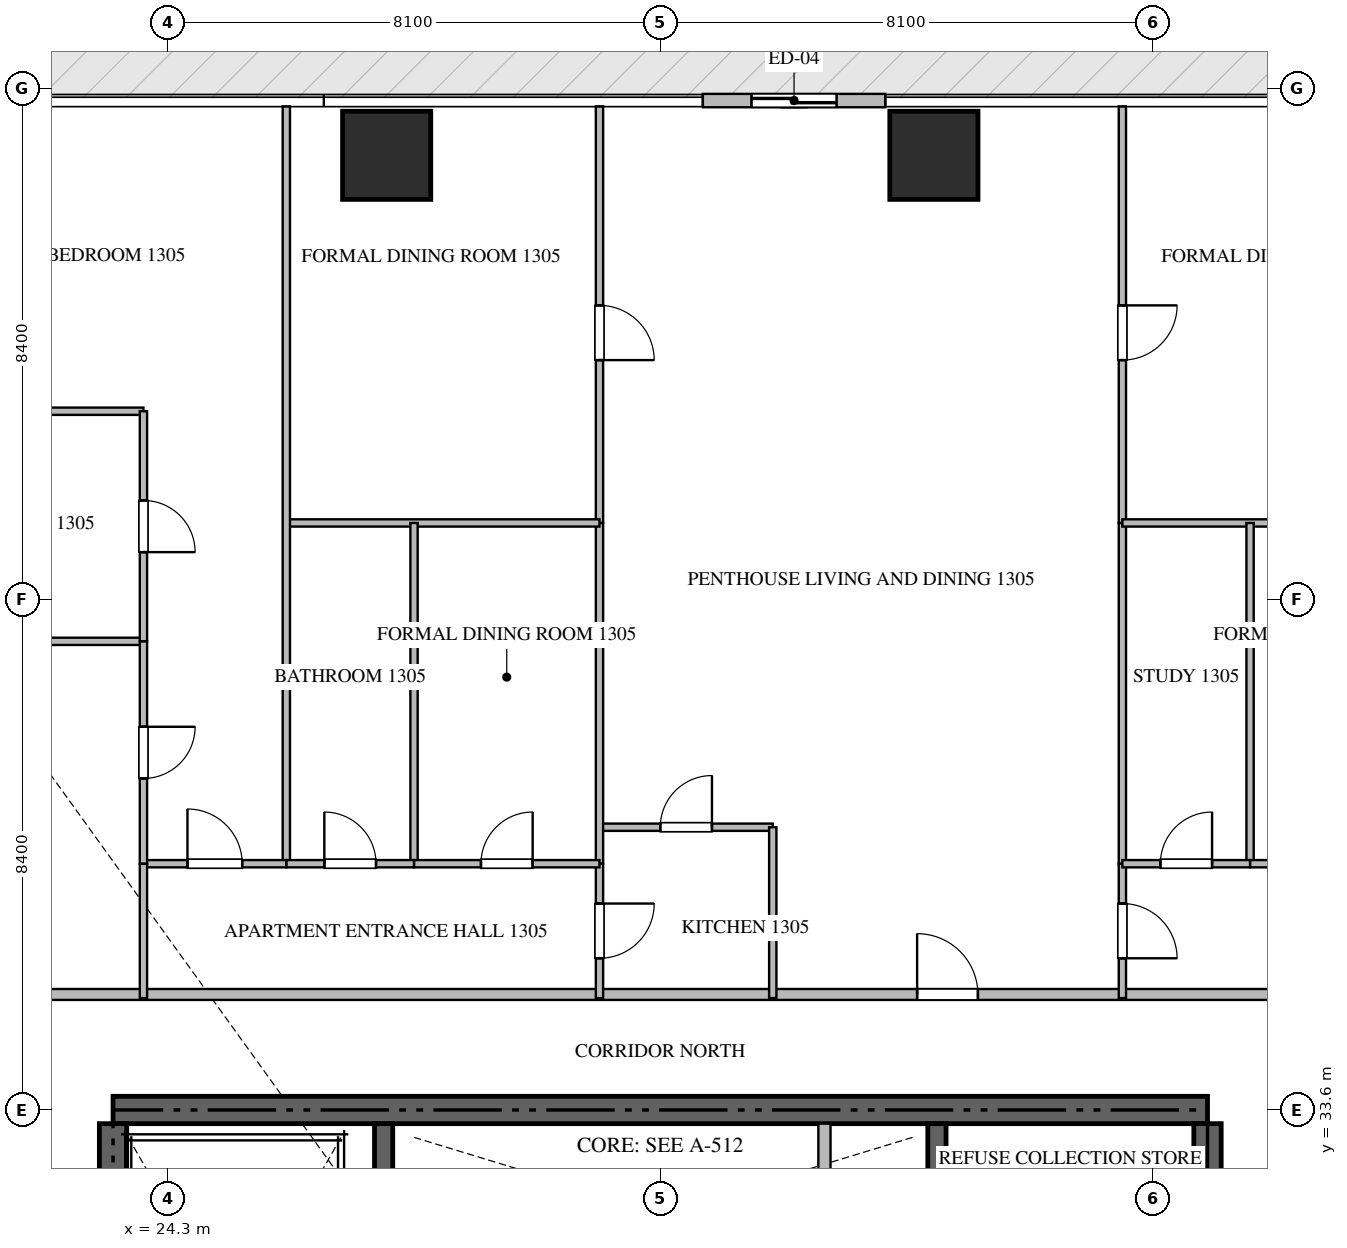
"""IFC4 building model, lengths in metres.
Left out: names, types, materials, properties, quantities, classifications, styles, units other than length and angle.
Written with IfcOpenShell. Run it as: python <this file> out.ifc"""

import sys

from ifc_helpers import new_model, si_unit, direction, frame, frame_2d, origin, origin_2d, place, context, subcontext, project, spatial, rectangle, extrude, source, transform, mapped, element, fill, save


model = new_model("IFC4")
c1 = context("Model", 3, precision=1e-05, world=origin(), true_north=direction((0.0, 1.0)))
c2 = subcontext(c1, "Body", "Model", "MODEL_VIEW")
j1 = project(units=[si_unit("LENGTHUNIT", "METRE"), si_unit("PLANEANGLEUNIT", "RADIAN")], contexts=[c1])
p1 = place(None, origin())
s1 = spatial("IfcSite", under=j1, at=p1, CompositionType="ELEMENT")
p2 = place(p1, origin())
s2 = spatial("IfcBuilding", under=s1, at=p2, CompositionType="ELEMENT")
p3 = place(p2, frame((0.0, 0.0, 56.7)))
s3 = spatial("IfcBuildingStorey", under=s2, at=p3, CompositionType="ELEMENT", Elevation=56.7)
p4 = place(p3, frame((41.4, 33.6, -0.26), z_axis=(0.0, 0.0, 1.0), x_axis=(-1.0, 0.0, 0.0)))
e1 = element("IfcWall", 1, at=p4, inside=s3, PredefinedType="SHEAR", context=c2, shape_type="SweptSolid", body=[
    extrude(rectangle(XDim=18.0, YDim=0.45, at=frame_2d((9.0, 0.0))), origin(), (0.0, 0.0, 1.0), 3.748),
])
p5 = place(p3, frame((23.4, 24.25, -0.26), z_axis=(0.0, 0.0, 1.0), x_axis=(0.0, 1.0, 0.0)))
e2 = element("IfcWall", 2, at=p5, inside=s3, PredefinedType="SHEAR", context=c2, shape_type="SweptSolid", body=[
    extrude(rectangle(XDim=9.125, YDim=0.45, at=frame_2d((4.562, 0.0))), origin(), (0.0, 0.0, 1.0), 3.748),
])
p6 = place(p3, frame((41.4, 27.75, -0.26), z_axis=(0.0, 0.0, 1.0), x_axis=(0.0, 1.0, 0.0)))
e3 = element("IfcWall", 3, at=p6, inside=s3, PredefinedType="SHEAR", context=c2, shape_type="SweptSolid", body=[
    extrude(rectangle(XDim=5.625, YDim=0.45, at=frame_2d((2.812, 0.0))), origin(), (0.0, 0.0, 1.0), 3.748),
])
p7 = place(p3, frame((27.85, 23.55, -0.26), z_axis=(0.0, 0.0, 1.0), x_axis=(0.0, 1.0, 0.0)))
e4 = element("IfcWall", 4, at=p7, inside=s3, PredefinedType="SHEAR", context=c2, shape_type="SweptSolid", body=[
    extrude(rectangle(XDim=9.825, YDim=0.3, at=frame_2d((4.913, 0.0))), origin(), (0.0, 0.0, 1.0), 3.748),
])
p8 = place(p3, frame((36.95, 27.05, -0.26), z_axis=(0.0, 0.0, 1.0), x_axis=(0.0, 1.0, 0.0)))
e5 = element("IfcWall", 5, at=p8, inside=s3, PredefinedType="SHEAR", context=c2, shape_type="SweptSolid", body=[
    extrude(rectangle(XDim=6.325, YDim=0.3, at=frame_2d((3.163, 0.0))), origin(), (0.0, 0.0, 1.0), 3.748),
])
m1 = source(origin(), c2, "Body", "SweptSolid", [
    extrude(rectangle(XDim=1.45, YDim=1.45, at=origin_2d()), origin(), (0.0, 0.0, 1.0), 3.75),
])
for number, where, z_axis, x_axis in (
    (6, (27.9, 49.3, -0.26), (0.0, 0.0, 1.0), (1.0, 0.0, 0.0)),
    (7, (36.9, 49.3, -0.26), (0.0, 0.0, 1.0), (1.0, 0.0, 0.0)),
):
    element("IfcColumn", number, at=place(p3, frame(where, z_axis=z_axis, x_axis=x_axis)), inside=s3, PredefinedType="COLUMN", context=c2, shape_type="MappedRepresentation", body=[
        mapped(m1, transform((0.0, 0.0, 0.0), scale=1.0)),
    ])
p9 = place(p3, frame((36.1, 50.2, 0.0), z_axis=(0.0, 0.0, 1.0), x_axis=(-1.0, 0.0, 0.0)))
e8 = element("IfcWall", 8, at=p9, inside=s3, PredefinedType="ELEMENTEDWALL", context=c2, shape_type="SweptSolid", body=[
    extrude(rectangle(XDim=3.0, YDim=0.22, at=frame_2d((1.5, 0.0))), origin(), (0.0, 0.0, 1.0), 3.475),
])
p10 = place(p9, frame((0.8, 0.0, 0.0)))
e9 = element("IfcOpeningElement", 9, at=p10, cuts=e8, PredefinedType="OPENING", context=c2, shape_type="SweptSolid", body=[
    extrude(rectangle(XDim=1.4, YDim=2.25, at=frame_2d((0.7, 1.125))), frame((0.0, 0.12, 0.0), z_axis=(0.0, -1.0, 0.0), x_axis=(1.0, 0.0, 0.0)), (0.0, 0.0, 1.0), 0.24),
])
p11 = place(p3, frame((35.1, 30.75, 0.0), z_axis=(0.0, 0.0, 1.0), x_axis=(0.0, 1.0, 0.0)))
e10 = element("IfcWall", 10, at=p11, inside=s3, PredefinedType="STANDARD", context=c2, shape_type="SweptSolid", body=[
    extrude(rectangle(XDim=2.625, YDim=0.2, at=frame_2d((1.312, 0.0))), origin(), (0.0, 0.0, 1.0), 3.49),
])
p12 = place(p3, frame((21.402, 35.5, 0.0), z_axis=(0.0, 0.0, 1.0), x_axis=(1.0, 0.0, 0.0)))
e11 = element("IfcWall", 11, at=p12, inside=s3, PredefinedType="PARTITIONING", context=c2, shape_type="SweptSolid", body=[
    extrude(rectangle(XDim=21.996, YDim=0.18, at=frame_2d((10.998, 0.0))), origin(), (0.0, 0.0, 1.0), 3.49),
])
p13 = place(p12, frame((15.222, 0.0, 0.0)))
e12 = element("IfcOpeningElement", 12, at=p13, cuts=e11, PredefinedType="OPENING", context=c2, shape_type="SweptSolid", body=[
    extrude(rectangle(XDim=1.0, YDim=2.15, at=frame_2d((0.5, 1.075))), frame((0.0, 0.1, 0.0), z_axis=(0.0, -1.0, 0.0), x_axis=(1.0, 0.0, 0.0)), (0.0, 0.0, 1.0), 0.2),
])
p14 = place(p3, frame((31.4, 38.25, 0.0), z_axis=(0.0, 0.0, 1.0), x_axis=(1.0, 0.0, 0.0)))
e13 = element("IfcWall", 13, at=p14, inside=s3, PredefinedType="PARTITIONING", context=c2, shape_type="SweptSolid", body=[
    extrude(rectangle(XDim=2.85, YDim=0.12, at=frame_2d((1.425, 0.0))), origin(), (0.0, 0.0, 1.0), 3.49),
])
p15 = place(p14, frame((1.0, 0.0, 0.0)))
e14 = element("IfcOpeningElement", 14, at=p15, cuts=e13, PredefinedType="OPENING", context=c2, shape_type="SweptSolid", body=[
    extrude(rectangle(XDim=0.85, YDim=2.1, at=frame_2d((0.425, 1.05))), frame((0.0, 0.07, 0.0), z_axis=(0.0, -1.0, 0.0), x_axis=(1.0, 0.0, 0.0)), (0.0, 0.0, 1.0), 0.14),
])
p16 = place(p3, frame((34.25, 38.25, 0.0), z_axis=(0.0, 0.0, 1.0), x_axis=(0.0, -1.0, 0.0)))
e15 = element("IfcWall", 15, at=p16, inside=s3, PredefinedType="PARTITIONING", context=c2, shape_type="SweptSolid", body=[
    extrude(rectangle(XDim=2.81, YDim=0.12, at=frame_2d((1.405, 0.0))), origin(), (0.0, 0.0, 1.0), 3.49),
])
p17 = place(p3, frame((31.4, 37.65, 0.0), z_axis=(0.0, 0.0, 1.0), x_axis=(0.0, -1.0, 0.0)))
e16 = element("IfcWall", 16, at=p17, inside=s3, PredefinedType="PARTITIONING", context=c2, shape_type="SweptSolid", body=[
    extrude(rectangle(XDim=2.21, YDim=0.12, at=frame_2d((1.105, 0.0))), origin(), (0.0, 0.0, 1.0), 3.49),
])
p18 = place(p17, frame((0.655, 0.0, 0.0)))
e17 = element("IfcOpeningElement", 17, at=p18, cuts=e16, PredefinedType="OPENING", context=c2, shape_type="SweptSolid", body=[
    extrude(rectangle(XDim=0.9, YDim=2.1, at=frame_2d((0.45, 1.05))), frame((0.0, 0.07, 0.0), z_axis=(0.0, -1.0, 0.0), x_axis=(1.0, 0.0, 0.0)), (0.0, 0.0, 1.0), 0.14),
])
p19 = place(p3, frame((31.4, 50.105, 0.0), z_axis=(0.0, 0.0, 1.0), x_axis=(0.0, -1.0, 0.0)))
e18 = element("IfcWall", 18, at=p19, inside=s3, PredefinedType="PARTITIONING", context=c2, shape_type="SweptSolid", body=[
    extrude(rectangle(XDim=6.851, YDim=0.12, at=frame_2d((3.426, 0.0))), origin(), (0.0, 0.0, 1.0), 3.49),
])
p20 = place(p19, frame((3.273, 0.0, 0.0)))
e19 = element("IfcOpeningElement", 19, at=p20, cuts=e18, PredefinedType="OPENING", context=c2, shape_type="SweptSolid", body=[
    extrude(rectangle(XDim=0.9, YDim=2.1, at=frame_2d((0.45, 1.05))), frame((0.0, 0.07, 0.0), z_axis=(0.0, -1.0, 0.0), x_axis=(1.0, 0.0, 0.0)), (0.0, 0.0, 1.0), 0.14),
])
p21 = place(p3, frame((31.4, 43.252, 0.0), z_axis=(0.0, 0.0, 1.0), x_axis=(0.0, -1.0, 0.0)))
e20 = element("IfcWall", 20, at=p21, inside=s3, PredefinedType="PARTITIONING", context=c2, shape_type="SweptSolid", body=[
    extrude(rectangle(XDim=5.6, YDim=0.12, at=frame_2d((2.8, 0.0))), origin(), (0.0, 0.0, 1.0), 3.49),
])
p22 = place(p3, frame((26.25, 43.254, 0.0), z_axis=(0.0, 0.0, 1.0), x_axis=(1.0, 0.0, 0.0)))
e21 = element("IfcWall", 21, at=p22, inside=s3, PredefinedType="PARTITIONING", context=c2, shape_type="SweptSolid", body=[
    extrude(rectangle(XDim=5.15, YDim=0.12, at=frame_2d((2.575, 0.0))), origin(), (0.0, 0.0, 1.0), 3.49),
])
p23 = place(p3, frame((26.25, 50.105, 0.0), z_axis=(0.0, 0.0, 1.0), x_axis=(0.0, -1.0, 0.0)))
e22 = element("IfcWall", 22, at=p23, inside=s3, PredefinedType="PARTITIONING", context=c2, shape_type="SweptSolid", body=[
    extrude(rectangle(XDim=12.455, YDim=0.12, at=frame_2d((6.228, 0.0))), origin(), (0.0, 0.0, 1.0), 3.49),
])
p24 = place(p3, frame((28.35, 43.254, 0.0), z_axis=(0.0, 0.0, 1.0), x_axis=(0.0, -1.0, 0.0)))
e23 = element("IfcWall", 23, at=p24, inside=s3, PredefinedType="PARTITIONING", context=c2, shape_type="SweptSolid", body=[
    extrude(rectangle(XDim=5.604, YDim=0.12, at=frame_2d((2.802, 0.0))), origin(), (0.0, 0.0, 1.0), 3.49),
])
p25 = place(p3, frame((26.25, 37.65, 0.0), z_axis=(0.0, 0.0, 1.0), x_axis=(1.0, 0.0, 0.0)))
e24 = element("IfcWall", 24, at=p25, inside=s3, PredefinedType="PARTITIONING", context=c2, shape_type="SweptSolid", body=[
    extrude(rectangle(XDim=2.1, YDim=0.12, at=frame_2d((1.05, 0.0))), origin(), (0.0, 0.0, 1.0), 3.49),
])
p26 = place(p25, frame((0.625, 0.0, 0.0)))
e25 = element("IfcOpeningElement", 25, at=p26, cuts=e24, PredefinedType="OPENING", context=c2, shape_type="SweptSolid", body=[
    extrude(rectangle(XDim=0.85, YDim=2.1, at=frame_2d((0.425, 1.05))), frame((0.0, 0.07, 0.0), z_axis=(0.0, -1.0, 0.0), x_axis=(1.0, 0.0, 0.0)), (0.0, 0.0, 1.0), 0.14),
])
p27 = place(p3, frame((28.352, 37.65, 0.0), z_axis=(0.0, 0.0, 1.0), x_axis=(1.0, 0.0, 0.0)))
e26 = element("IfcWall", 26, at=p27, inside=s3, PredefinedType="PARTITIONING", context=c2, shape_type="SweptSolid", body=[
    extrude(rectangle(XDim=3.048, YDim=0.12, at=frame_2d((1.524, 0.0))), origin(), (0.0, 0.0, 1.0), 3.49),
])
p28 = place(p27, frame((1.099, 0.0, 0.0)))
e27 = element("IfcOpeningElement", 27, at=p28, cuts=e26, PredefinedType="OPENING", context=c2, shape_type="SweptSolid", body=[
    extrude(rectangle(XDim=0.85, YDim=2.1, at=frame_2d((0.425, 1.05))), frame((0.0, 0.07, 0.0), z_axis=(0.0, -1.0, 0.0), x_axis=(1.0, 0.0, 0.0)), (0.0, 0.0, 1.0), 0.14),
])
p29 = place(p3, frame((23.9, 37.65, 0.0), z_axis=(0.0, 0.0, 1.0), x_axis=(1.0, 0.0, 0.0)))
e28 = element("IfcWall", 28, at=p29, inside=s3, PredefinedType="PARTITIONING", context=c2, shape_type="SweptSolid", body=[
    extrude(rectangle(XDim=2.348, YDim=0.12, at=frame_2d((1.174, 0.0))), origin(), (0.0, 0.0, 1.0), 3.49),
])
p30 = place(p29, frame((0.724, 0.0, 0.0)))
e29 = element("IfcOpeningElement", 29, at=p30, cuts=e28, PredefinedType="OPENING", context=c2, shape_type="SweptSolid", body=[
    extrude(rectangle(XDim=0.9, YDim=2.1, at=frame_2d((0.45, 1.05))), frame((0.0, 0.07, 0.0), z_axis=(0.0, -1.0, 0.0), x_axis=(1.0, 0.0, 0.0)), (0.0, 0.0, 1.0), 0.14),
])
for number, where, z_axis, x_axis in (
    (30, (20.2, 45.091, 0.0), (0.0, 0.0, 1.0), (1.0, 0.0, 0.0)),
    (31, (20.2, 41.307, 0.0), (0.0, 0.0, 1.0), (1.0, 0.0, 0.0)),
):
    element("IfcWall", number, at=place(p3, frame(where, z_axis=z_axis, x_axis=x_axis)), inside=s3, PredefinedType="PARTITIONING", context=c2, shape_type="SweptSolid", body=[
        extrude(rectangle(XDim=3.7, YDim=0.12, at=frame_2d((1.85, 0.0))), origin(), (0.0, 0.0, 1.0), 3.49),
    ])
p31 = place(p3, frame((23.9, 45.091, 0.0), z_axis=(0.0, 0.0, 1.0), x_axis=(0.0, -1.0, 0.0)))
e32 = element("IfcWall", 32, at=p31, inside=s3, PredefinedType="PARTITIONING", context=c2, shape_type="SweptSolid", body=[
    extrude(rectangle(XDim=3.784, YDim=0.12, at=frame_2d((1.892, 0.0))), origin(), (0.0, 0.0, 1.0), 3.49),
])
p32 = place(p31, frame((1.467, 0.0, 0.0)))
e33 = element("IfcOpeningElement", 33, at=p32, cuts=e32, PredefinedType="OPENING", context=c2, shape_type="SweptSolid", body=[
    extrude(rectangle(XDim=0.85, YDim=2.1, at=frame_2d((0.425, 1.05))), frame((0.0, 0.07, 0.0), z_axis=(0.0, -1.0, 0.0), x_axis=(1.0, 0.0, 0.0)), (0.0, 0.0, 1.0), 0.14),
])
p33 = place(p3, frame((23.9, 41.305, 0.0), z_axis=(0.0, 0.0, 1.0), x_axis=(0.0, -1.0, 0.0)))
e34 = element("IfcWall", 34, at=p33, inside=s3, PredefinedType="PARTITIONING", context=c2, shape_type="SweptSolid", body=[
    extrude(rectangle(XDim=3.655, YDim=0.12, at=frame_2d((1.828, 0.0))), origin(), (0.0, 0.0, 1.0), 3.49),
])
p34 = place(p33, frame((1.403, 0.0, 0.0)))
e35 = element("IfcOpeningElement", 35, at=p34, cuts=e34, PredefinedType="OPENING", context=c2, shape_type="SweptSolid", body=[
    extrude(rectangle(XDim=0.85, YDim=2.1, at=frame_2d((0.425, 1.05))), frame((0.0, 0.07, 0.0), z_axis=(0.0, -1.0, 0.0), x_axis=(1.0, 0.0, 0.0)), (0.0, 0.0, 1.0), 0.14),
])
p35 = place(p3, frame((23.9, 37.648, 0.0), z_axis=(0.0, 0.0, 1.0), x_axis=(0.0, -1.0, 0.0)))
e36 = element("IfcWall", 36, at=p35, inside=s3, PredefinedType="PARTITIONING", context=c2, shape_type="SweptSolid", body=[
    extrude(rectangle(XDim=2.208, YDim=0.12, at=frame_2d((1.104, 0.0))), origin(), (0.0, 0.0, 1.0), 3.49),
])
p36 = place(p3, frame((40.0, 37.65, 0.0), z_axis=(0.0, 0.0, 1.0), x_axis=(0.0, -1.0, 0.0)))
e37 = element("IfcWall", 37, at=p36, inside=s3, PredefinedType="PARTITIONING", context=c2, shape_type="SweptSolid", body=[
    extrude(rectangle(XDim=2.21, YDim=0.12, at=frame_2d((1.105, 0.0))), origin(), (0.0, 0.0, 1.0), 3.49),
])
p37 = place(p36, frame((0.655, 0.0, 0.0)))
e38 = element("IfcOpeningElement", 38, at=p37, cuts=e37, PredefinedType="OPENING", context=c2, shape_type="SweptSolid", body=[
    extrude(rectangle(XDim=0.9, YDim=2.1, at=frame_2d((0.45, 1.05))), frame((0.0, 0.07, 0.0), z_axis=(0.0, -1.0, 0.0), x_axis=(1.0, 0.0, 0.0)), (0.0, 0.0, 1.0), 0.14),
])
p38 = place(p3, frame((40.0, 50.105, 0.0), z_axis=(0.0, 0.0, 1.0), x_axis=(0.0, -1.0, 0.0)))
e39 = element("IfcWall", 39, at=p38, inside=s3, PredefinedType="PARTITIONING", context=c2, shape_type="SweptSolid", body=[
    extrude(rectangle(XDim=6.851, YDim=0.12, at=frame_2d((3.426, 0.0))), origin(), (0.0, 0.0, 1.0), 3.49),
])
p39 = place(p38, frame((3.273, 0.0, 0.0)))
e40 = element("IfcOpeningElement", 40, at=p39, cuts=e39, PredefinedType="OPENING", context=c2, shape_type="SweptSolid", body=[
    extrude(rectangle(XDim=0.9, YDim=2.1, at=frame_2d((0.45, 1.05))), frame((0.0, 0.07, 0.0), z_axis=(0.0, -1.0, 0.0), x_axis=(1.0, 0.0, 0.0)), (0.0, 0.0, 1.0), 0.14),
])
p40 = place(p3, frame((40.0, 43.252, 0.0), z_axis=(0.0, 0.0, 1.0), x_axis=(0.0, -1.0, 0.0)))
e41 = element("IfcWall", 41, at=p40, inside=s3, PredefinedType="PARTITIONING", context=c2, shape_type="SweptSolid", body=[
    extrude(rectangle(XDim=5.6, YDim=0.12, at=frame_2d((2.8, 0.0))), origin(), (0.0, 0.0, 1.0), 3.49),
])
p41 = place(p3, frame((40.0, 43.254, 0.0), z_axis=(0.0, 0.0, 1.0), x_axis=(1.0, 0.0, 0.0)))
e42 = element("IfcWall", 42, at=p41, inside=s3, PredefinedType="PARTITIONING", context=c2, shape_type="SweptSolid", body=[
    extrude(rectangle(XDim=5.15, YDim=0.12, at=frame_2d((2.575, 0.0))), origin(), (0.0, 0.0, 1.0), 3.49),
])
p42 = place(p3, frame((42.1, 43.254, 0.0), z_axis=(0.0, 0.0, 1.0), x_axis=(0.0, -1.0, 0.0)))
e43 = element("IfcWall", 43, at=p42, inside=s3, PredefinedType="PARTITIONING", context=c2, shape_type="SweptSolid", body=[
    extrude(rectangle(XDim=5.604, YDim=0.12, at=frame_2d((2.802, 0.0))), origin(), (0.0, 0.0, 1.0), 3.49),
])
p43 = place(p3, frame((40.0, 37.65, 0.0), z_axis=(0.0, 0.0, 1.0), x_axis=(1.0, 0.0, 0.0)))
e44 = element("IfcWall", 44, at=p43, inside=s3, PredefinedType="PARTITIONING", context=c2, shape_type="SweptSolid", body=[
    extrude(rectangle(XDim=2.1, YDim=0.12, at=frame_2d((1.05, 0.0))), origin(), (0.0, 0.0, 1.0), 3.49),
])
p44 = place(p43, frame((0.625, 0.0, 0.0)))
e45 = element("IfcOpeningElement", 45, at=p44, cuts=e44, PredefinedType="OPENING", context=c2, shape_type="SweptSolid", body=[
    extrude(rectangle(XDim=0.85, YDim=2.1, at=frame_2d((0.425, 1.05))), frame((0.0, 0.07, 0.0), z_axis=(0.0, -1.0, 0.0), x_axis=(1.0, 0.0, 0.0)), (0.0, 0.0, 1.0), 0.14),
])
p45 = place(p3, frame((42.102, 37.65, 0.0), z_axis=(0.0, 0.0, 1.0), x_axis=(1.0, 0.0, 0.0)))
e46 = element("IfcWall", 46, at=p45, inside=s3, PredefinedType="PARTITIONING", context=c2, shape_type="SweptSolid", body=[
    extrude(rectangle(XDim=3.048, YDim=0.12, at=frame_2d((1.524, 0.0))), origin(), (0.0, 0.0, 1.0), 3.49),
])
p46 = place(p45, frame((1.099, 0.0, 0.0)))
e47 = element("IfcOpeningElement", 47, at=p46, cuts=e46, PredefinedType="OPENING", context=c2, shape_type="SweptSolid", body=[
    extrude(rectangle(XDim=0.85, YDim=2.1, at=frame_2d((0.425, 1.05))), frame((0.0, 0.07, 0.0), z_axis=(0.0, -1.0, 0.0), x_axis=(1.0, 0.0, 0.0)), (0.0, 0.0, 1.0), 0.14),
])
m2 = source(origin(), c2, "Body", "SweptSolid", [
    extrude(rectangle(XDim=1.4, YDim=2.25, at=frame_2d((0.7, 1.125))), frame((0.0, 0.025, 0.0), z_axis=(0.0, -1.0, 0.0), x_axis=(1.0, 0.0, 0.0)), (0.0, 0.0, 1.0), 0.05),
])
p47 = place(p10, origin())
e48 = element("IfcDoor", 48, at=p47, inside=s3, OperationType="SLIDING_TO_LEFT", PredefinedType="DOOR", context=c2, shape_type="MappedRepresentation", body=[
    mapped(m2, transform((0.0, 0.0, 0.0), scale=1.0)),
])
fill(e9, e48)
m3 = source(origin(), c2, "Body", "SweptSolid", [
    extrude(rectangle(XDim=1.0, YDim=2.15, at=frame_2d((0.5, 1.075))), frame((0.0, 0.025, 0.0), z_axis=(0.0, -1.0, 0.0), x_axis=(1.0, 0.0, 0.0)), (0.0, 0.0, 1.0), 0.05),
])
p48 = place(p13, origin())
e49 = element("IfcDoor", 49, at=p48, inside=s3, OperationType="SINGLE_SWING_LEFT", PredefinedType="DOOR", context=c2, shape_type="MappedRepresentation", body=[
    mapped(m3, transform((0.0, 0.0, 0.0), scale=1.0)),
])
fill(e12, e49)
m4 = source(origin(), c2, "Body", "SweptSolid", [
    extrude(rectangle(XDim=0.85, YDim=2.1, at=frame_2d((0.425, 1.05))), frame((0.0, 0.025, 0.0), z_axis=(0.0, -1.0, 0.0), x_axis=(1.0, 0.0, 0.0)), (0.0, 0.0, 1.0), 0.05),
])
p49 = place(p15, origin())
e50 = element("IfcDoor", 50, at=p49, inside=s3, OperationType="SINGLE_SWING_RIGHT", PredefinedType="DOOR", context=c2, shape_type="MappedRepresentation", body=[
    mapped(m4, transform((0.0, 0.0, 0.0), scale=1.0)),
])
fill(e14, e50)
m5 = source(origin(), c2, "Body", "SweptSolid", [
    extrude(rectangle(XDim=0.9, YDim=2.1, at=frame_2d((0.45, 1.05))), frame((0.0, 0.025, 0.0), z_axis=(0.0, -1.0, 0.0), x_axis=(1.0, 0.0, 0.0)), (0.0, 0.0, 1.0), 0.05),
])
p50 = place(p18, origin())
e51 = element("IfcDoor", 51, at=p50, inside=s3, OperationType="SINGLE_SWING_LEFT", PredefinedType="DOOR", context=c2, shape_type="MappedRepresentation", body=[
    mapped(m5, transform((0.0, 0.0, 0.0), scale=1.0)),
])
fill(e17, e51)
p51 = place(p20, origin())
e52 = element("IfcDoor", 52, at=p51, inside=s3, OperationType="SINGLE_SWING_RIGHT", PredefinedType="DOOR", context=c2, shape_type="MappedRepresentation", body=[
    mapped(m5, transform((0.0, 0.0, 0.0), scale=1.0)),
])
fill(e19, e52)
p52 = place(p26, origin())
e53 = element("IfcDoor", 53, at=p52, inside=s3, OperationType="SINGLE_SWING_LEFT", PredefinedType="DOOR", context=c2, shape_type="MappedRepresentation", body=[
    mapped(m4, transform((0.0, 0.0, 0.0), scale=1.0)),
])
fill(e25, e53)
p53 = place(p28, origin())
e54 = element("IfcDoor", 54, at=p53, inside=s3, OperationType="SINGLE_SWING_RIGHT", PredefinedType="DOOR", context=c2, shape_type="MappedRepresentation", body=[
    mapped(m4, transform((0.0, 0.0, 0.0), scale=1.0)),
])
fill(e27, e54)
p54 = place(p30, origin())
e55 = element("IfcDoor", 55, at=p54, inside=s3, OperationType="SINGLE_SWING_LEFT", PredefinedType="DOOR", context=c2, shape_type="MappedRepresentation", body=[
    mapped(m5, transform((0.0, 0.0, 0.0), scale=1.0)),
])
fill(e29, e55)
p55 = place(p32, origin())
e56 = element("IfcDoor", 56, at=p55, inside=s3, OperationType="SINGLE_SWING_RIGHT", PredefinedType="DOOR", context=c2, shape_type="MappedRepresentation", body=[
    mapped(m4, transform((0.0, 0.0, 0.0), scale=1.0)),
])
fill(e33, e56)
p56 = place(p34, origin())
e57 = element("IfcDoor", 57, at=p56, inside=s3, OperationType="SINGLE_SWING_LEFT", PredefinedType="DOOR", context=c2, shape_type="MappedRepresentation", body=[
    mapped(m4, transform((0.0, 0.0, 0.0), scale=1.0)),
])
fill(e35, e57)
p57 = place(p37, origin())
e58 = element("IfcDoor", 58, at=p57, inside=s3, OperationType="SINGLE_SWING_RIGHT", PredefinedType="DOOR", context=c2, shape_type="MappedRepresentation", body=[
    mapped(m5, transform((0.0, 0.0, 0.0), scale=1.0)),
])
fill(e38, e58)
p58 = place(p39, origin())
e59 = element("IfcDoor", 59, at=p58, inside=s3, OperationType="SINGLE_SWING_LEFT", PredefinedType="DOOR", context=c2, shape_type="MappedRepresentation", body=[
    mapped(m5, transform((0.0, 0.0, 0.0), scale=1.0)),
])
fill(e40, e59)
p59 = place(p44, origin())
e60 = element("IfcDoor", 60, at=p59, inside=s3, OperationType="SINGLE_SWING_RIGHT", PredefinedType="DOOR", context=c2, shape_type="MappedRepresentation", body=[
    mapped(m4, transform((0.0, 0.0, 0.0), scale=1.0)),
])
fill(e45, e60)
save(model, sys.argv[1])
